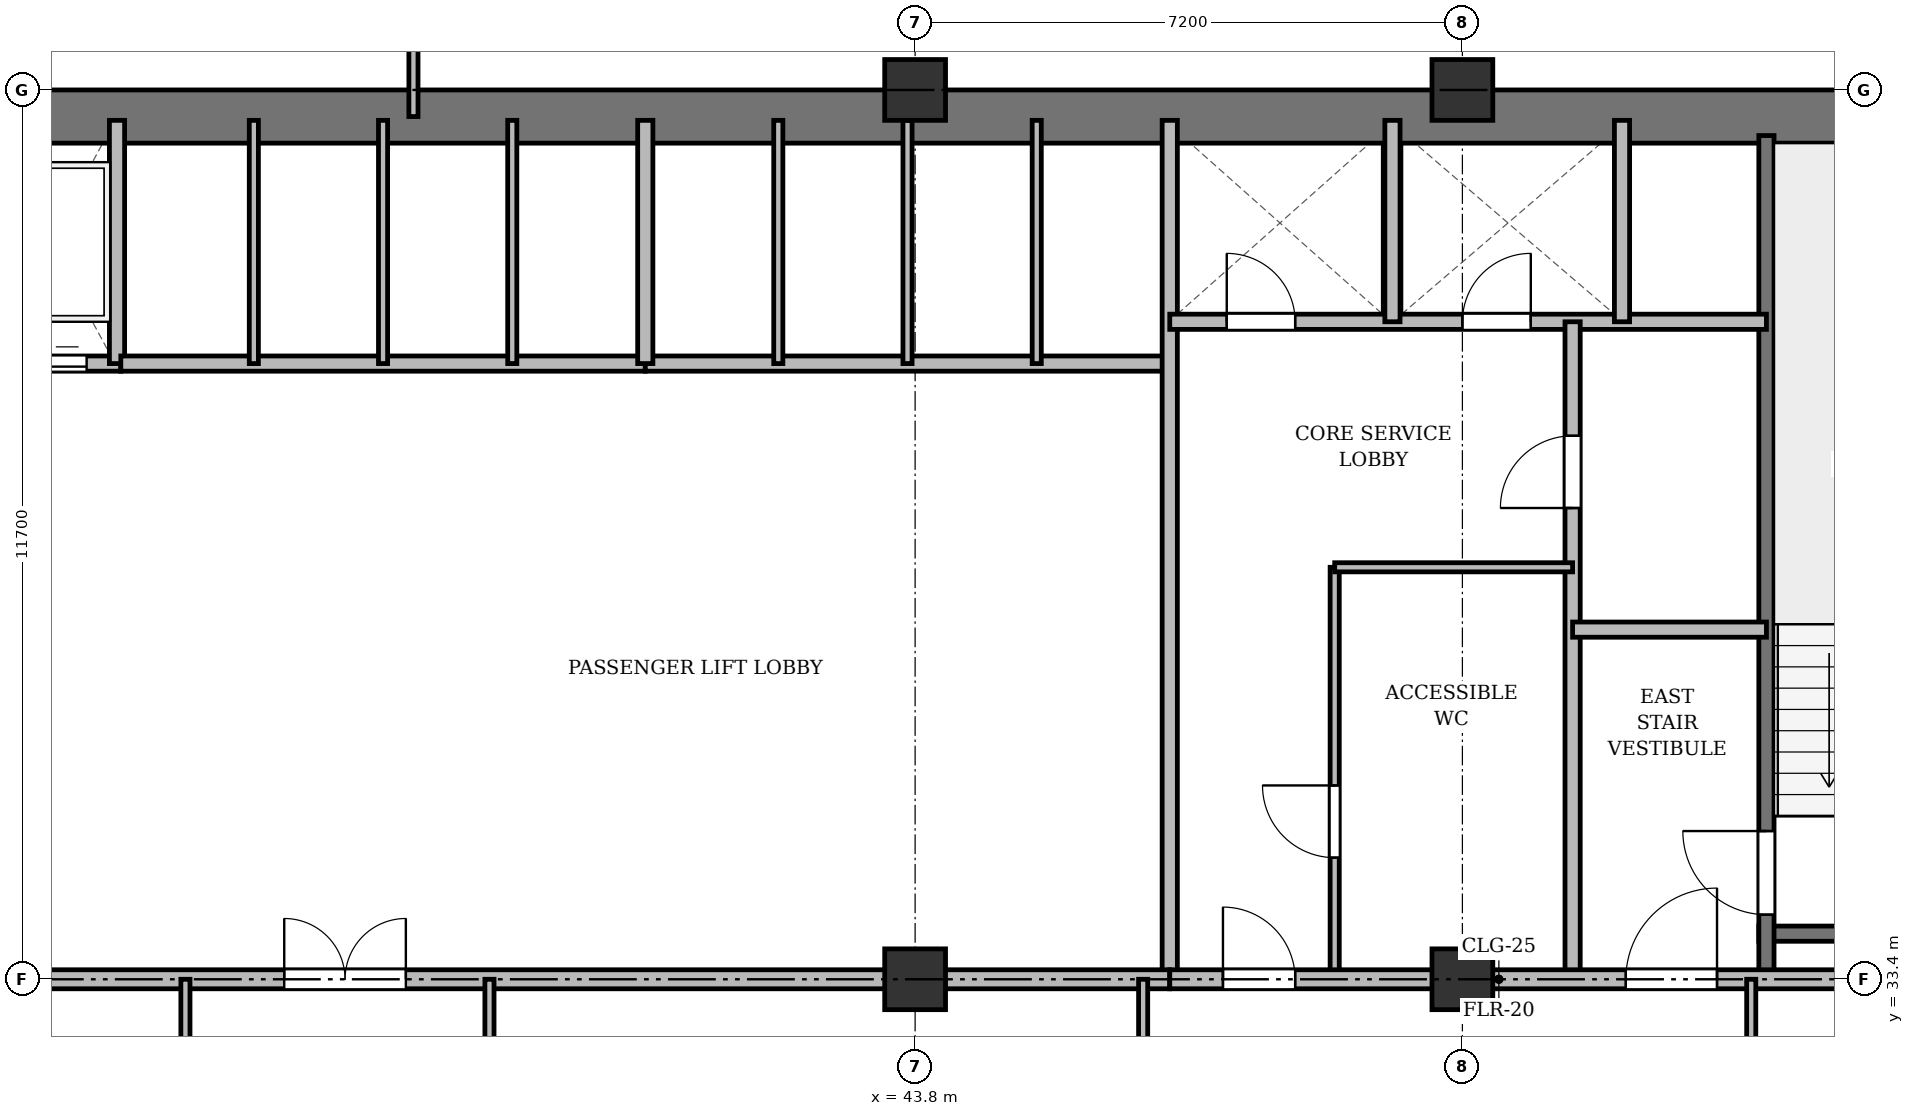
"""IFC4 building model, lengths in metres.
Left out: names, types, materials, properties, quantities, classifications, styles, units other than length and angle.
Written with IfcOpenShell. Run it as: python <this file> out.ifc"""

import sys

from ifc_helpers import new_model, si_unit, direction, frame, frame_2d, origin, origin_2d, place, context, subcontext, project, spatial, rectangle, extrude, source, transform, mapped, element, fill, save


model = new_model("IFC4")
c1 = context("Model", 3, precision=1e-05, world=origin(), true_north=direction((0.0, 1.0)))
c2 = subcontext(c1, "Body", "Model", "MODEL_VIEW")
j1 = project(units=[si_unit("LENGTHUNIT", "METRE"), si_unit("PLANEANGLEUNIT", "RADIAN")], contexts=[c1])
p1 = place(None, origin())
s1 = spatial("IfcSite", under=j1, at=p1, CompositionType="ELEMENT")
p2 = place(p1, origin())
s2 = spatial("IfcBuilding", under=s1, at=p2, CompositionType="ELEMENT")
p3 = place(p2, frame((0.0, 0.0, 121.3)))
s3 = spatial("IfcBuildingStorey", under=s2, at=p3, CompositionType="ELEMENT", Elevation=121.3)
m1 = source(origin(), c2, "Body", "SweptSolid", [
    extrude(rectangle(XDim=0.8, YDim=0.8, at=origin_2d()), origin(), (0.0, 0.0, 1.0), 3.6),
])
for number, where, z_axis, x_axis in (
    (1, (43.8, 33.4, 0.0), (0.0, 0.0, 1.0), (1.0, 0.0, 0.0)),
    (2, (43.8, 45.1, 0.0), (0.0, 0.0, 1.0), (1.0, 0.0, 0.0)),
    (3, (51.0, 33.4, 0.0), (0.0, 0.0, 1.0), (1.0, 0.0, 0.0)),
    (4, (51.0, 45.1, 0.0), (0.0, 0.0, 1.0), (1.0, 0.0, 0.0)),
):
    element("IfcColumn", number, at=place(p3, frame(where, z_axis=z_axis, x_axis=x_axis)), inside=s3, PredefinedType="COLUMN", context=c2, shape_type="MappedRepresentation", body=[
        mapped(m1, transform((0.0, 0.0, 0.0), x_axis=(1.0, 0.0, 0.0), y_axis=(0.0, 1.0, 0.0), z_axis=(0.0, 0.0, 1.0), scale=1.0)),
    ])
p4 = place(p3, frame((15.5, 44.75, 0.0), z_axis=(0.0, 0.0, 1.0), x_axis=(1.0, 0.0, 0.0)))
e5 = element("IfcWall", 5, at=p4, inside=s3, PredefinedType="SHEAR", context=c2, shape_type="SweptSolid", body=[
    extrude(rectangle(XDim=43.4, YDim=0.7, at=frame_2d((21.7, 0.0))), origin(), (0.0, 0.0, 1.0), 3.34),
])
p5 = place(p3, frame((54.9, 34.0, 0.0), z_axis=(0.0, 0.0, 1.0), x_axis=(1.0, 0.0, 0.0)))
e6 = element("IfcWall", 6, at=p5, inside=s3, PredefinedType="SHEAR", context=c2, shape_type="SweptSolid", body=[
    extrude(rectangle(XDim=3.4, YDim=0.2, at=frame_2d((1.7, 0.0))), origin(), (0.0, 0.0, 1.0), 3.34),
])
p6 = place(p3, frame((55.0, 33.4, 0.0), z_axis=(0.0, 0.0, 1.0), x_axis=(0.0, 1.0, 0.0)))
e7 = element("IfcWall", 7, at=p6, inside=s3, PredefinedType="SHEAR", context=c2, shape_type="SweptSolid", body=[
    extrude(rectangle(XDim=11.1, YDim=0.2, at=frame_2d((5.55, 0.0))), origin(), (0.0, 0.0, 1.0), 3.34),
])
p7 = place(p6, frame((0.85, 0.0, 0.0)))
e8 = element("IfcOpeningElement", 8, at=p7, cuts=e7, PredefinedType="OPENING", context=c2, shape_type="SweptSolid", body=[
    extrude(rectangle(XDim=1.1, YDim=2.15, at=frame_2d((0.55, 1.075))), frame((0.0, 0.11, 0.0), z_axis=(0.0, -1.0, 0.0), x_axis=(1.0, 0.0, 0.0)), (0.0, 0.0, 1.0), 0.22),
])
p8 = place(p3, frame((26.4, 41.5, 0.0), z_axis=(0.0, 0.0, 1.0), x_axis=(1.0, 0.0, 0.0)))
e9 = element("IfcWall", 9, at=p8, inside=s3, PredefinedType="SOLIDWALL", context=c2, shape_type="SweptSolid", body=[
    extrude(rectangle(XDim=6.95, YDim=0.2, at=frame_2d((3.475, 0.0))), origin(), (0.0, 0.0, 1.0), 3.34),
])
p9 = place(p8, frame((0.35, 0.0, 0.0)))
e10 = element("IfcOpeningElement", 10, at=p9, cuts=e9, PredefinedType="OPENING", context=c2, shape_type="SweptSolid", body=[
    extrude(rectangle(XDim=1.05, YDim=2.15, at=frame_2d((0.525, 1.075))), frame((0.0, 0.11, 0.0), z_axis=(0.0, -1.0, 0.0), x_axis=(1.0, 0.0, 0.0)), (0.0, 0.0, 1.0), 0.22),
])
p10 = place(p8, frame((2.05, 0.0, 0.0)))
e11 = element("IfcOpeningElement", 11, at=p10, cuts=e9, PredefinedType="OPENING", context=c2, shape_type="SweptSolid", body=[
    extrude(rectangle(XDim=1.05, YDim=2.15, at=frame_2d((0.525, 1.075))), frame((0.0, 0.11, 0.0), z_axis=(0.0, -1.0, 0.0), x_axis=(1.0, 0.0, 0.0)), (0.0, 0.0, 1.0), 0.22),
])
p11 = place(p8, frame((3.75, 0.0, 0.0)))
e12 = element("IfcOpeningElement", 12, at=p11, cuts=e9, PredefinedType="OPENING", context=c2, shape_type="SweptSolid", body=[
    extrude(rectangle(XDim=1.05, YDim=2.15, at=frame_2d((0.525, 1.075))), frame((0.0, 0.11, 0.0), z_axis=(0.0, -1.0, 0.0), x_axis=(1.0, 0.0, 0.0)), (0.0, 0.0, 1.0), 0.22),
])
p12 = place(p8, frame((5.45, 0.0, 0.0)))
e13 = element("IfcOpeningElement", 13, at=p12, cuts=e9, PredefinedType="OPENING", context=c2, shape_type="SweptSolid", body=[
    extrude(rectangle(XDim=1.05, YDim=2.15, at=frame_2d((0.525, 1.075))), frame((0.0, 0.11, 0.0), z_axis=(0.0, -1.0, 0.0), x_axis=(1.0, 0.0, 0.0)), (0.0, 0.0, 1.0), 0.22),
])
p13 = place(p3, frame((33.3, 41.5, 0.0), z_axis=(0.0, 0.0, 1.0), x_axis=(0.0, 1.0, 0.0)))
e14 = element("IfcWall", 14, at=p13, inside=s3, PredefinedType="SOLIDWALL", context=c2, shape_type="SweptSolid", body=[
    extrude(rectangle(XDim=3.2, YDim=0.2, at=frame_2d((1.6, 0.0))), origin(), (0.0, 0.0, 1.0), 3.34),
])
p14 = place(p3, frame((33.35, 41.5, 0.0), z_axis=(0.0, 0.0, 1.0), x_axis=(1.0, 0.0, 0.0)))
e15 = element("IfcWall", 15, at=p14, inside=s3, PredefinedType="SOLIDWALL", context=c2, shape_type="SweptSolid", body=[
    extrude(rectangle(XDim=6.9, YDim=0.2, at=frame_2d((3.45, 0.0))), origin(), (0.0, 0.0, 1.0), 3.34),
])
for number, where, z_axis, x_axis in (
    (16, (35.1, 41.5, 0.0), (0.0, 0.0, 1.0), (0.0, 1.0, 0.0)),
    (17, (36.8, 41.5, 0.0), (0.0, 0.0, 1.0), (0.0, 1.0, 0.0)),
    (18, (38.5, 41.5, 0.0), (0.0, 0.0, 1.0), (0.0, 1.0, 0.0)),
):
    element("IfcWall", number, at=place(p3, frame(where, z_axis=z_axis, x_axis=x_axis)), inside=s3, PredefinedType="PARTITIONING", context=c2, shape_type="SweptSolid", body=[
        extrude(rectangle(XDim=3.2, YDim=0.12, at=frame_2d((1.6, 0.0))), origin(), (0.0, 0.0, 1.0), 3.34),
    ])
p15 = place(p3, frame((40.25, 41.5, 0.0), z_axis=(0.0, 0.0, 1.0), x_axis=(1.0, 0.0, 0.0)))
e19 = element("IfcWall", 19, at=p15, inside=s3, PredefinedType="SOLIDWALL", context=c2, shape_type="SweptSolid", body=[
    extrude(rectangle(XDim=6.9, YDim=0.2, at=frame_2d((3.45, 0.0))), origin(), (0.0, 0.0, 1.0), 2.84),
])
p16 = place(p3, frame((40.25, 41.5, 0.0), z_axis=(0.0, 0.0, 1.0), x_axis=(0.0, 1.0, 0.0)))
e20 = element("IfcWall", 20, at=p16, inside=s3, PredefinedType="SOLIDWALL", context=c2, shape_type="SweptSolid", body=[
    extrude(rectangle(XDim=3.2, YDim=0.2, at=frame_2d((1.6, 0.0))), origin(), (0.0, 0.0, 1.0), 3.34),
])
p17 = place(p3, frame((42.0, 41.5, 0.0), z_axis=(0.0, 0.0, 1.0), x_axis=(0.0, 1.0, 0.0)))
e21 = element("IfcWall", 21, at=p17, inside=s3, PredefinedType="PARTITIONING", context=c2, shape_type="SweptSolid", body=[
    extrude(rectangle(XDim=3.2, YDim=0.12, at=frame_2d((1.6, 0.0))), origin(), (0.0, 0.0, 1.0), 3.34),
])
p18 = place(p3, frame((43.7, 41.5, 0.0), z_axis=(0.0, 0.0, 1.0), x_axis=(0.0, 1.0, 0.0)))
e22 = element("IfcWall", 22, at=p18, inside=s3, PredefinedType="PARTITIONING", context=c2, shape_type="SweptSolid", body=[
    extrude(rectangle(XDim=3.2, YDim=0.12, at=frame_2d((1.6, 0.0))), origin(), (0.0, 0.0, 1.0), 2.84),
])
p19 = place(p3, frame((45.4, 41.5, 0.0), z_axis=(0.0, 0.0, 1.0), x_axis=(0.0, 1.0, 0.0)))
e23 = element("IfcWall", 23, at=p19, inside=s3, PredefinedType="PARTITIONING", context=c2, shape_type="SweptSolid", body=[
    extrude(rectangle(XDim=3.2, YDim=0.12, at=frame_2d((1.6, 0.0))), origin(), (0.0, 0.0, 1.0), 3.34),
])
p20 = place(p3, frame((47.15, 33.4, 0.0), z_axis=(0.0, 0.0, 1.0), x_axis=(0.0, 1.0, 0.0)))
e24 = element("IfcWall", 24, at=p20, inside=s3, PredefinedType="SOLIDWALL", context=c2, shape_type="SweptSolid", body=[
    extrude(rectangle(XDim=11.3, YDim=0.2, at=frame_2d((5.65, 0.0))), origin(), (0.0, 0.0, 1.0), 2.752),
])
p21 = place(p3, frame((26.3, 33.4, 0.0), z_axis=(0.0, 0.0, 1.0), x_axis=(1.0, 0.0, 0.0)))
e25 = element("IfcWall", 25, at=p21, inside=s3, PredefinedType="PARTITIONING", context=c2, shape_type="SweptSolid", body=[
    extrude(rectangle(XDim=20.85, YDim=0.25, at=frame_2d((10.425, 0.0))), origin(), (0.0, 0.0, 1.0), 2.752),
])
p22 = place(p21, frame((9.2, 0.0, 0.0)))
e26 = element("IfcOpeningElement", 26, at=p22, cuts=e25, PredefinedType="OPENING", context=c2, shape_type="SweptSolid", body=[
    extrude(rectangle(XDim=1.6, YDim=2.2, at=frame_2d((0.8, 1.1))), frame((0.0, 0.135, 0.0), z_axis=(0.0, -1.0, 0.0), x_axis=(1.0, 0.0, 0.0)), (0.0, 0.0, 1.0), 0.27),
])
p23 = place(p3, frame((47.15, 42.05, 0.0), z_axis=(0.0, 0.0, 1.0), x_axis=(1.0, 0.0, 0.0)))
e27 = element("IfcWall", 27, at=p23, inside=s3, PredefinedType="SOLIDWALL", context=c2, shape_type="SweptSolid", body=[
    extrude(rectangle(XDim=7.85, YDim=0.2, at=frame_2d((3.925, 0.0))), origin(), (0.0, 0.0, 1.0), 2.84),
])
p24 = place(p23, frame((0.75, 0.0, 0.0)))
e28 = element("IfcOpeningElement", 28, at=p24, cuts=e27, PredefinedType="OPENING", context=c2, shape_type="SweptSolid", body=[
    extrude(rectangle(XDim=0.9, YDim=2.1, at=frame_2d((0.45, 1.05))), frame((0.0, 0.11, 0.0), z_axis=(0.0, -1.0, 0.0), x_axis=(1.0, 0.0, 0.0)), (0.0, 0.0, 1.0), 0.22),
])
p25 = place(p23, frame((3.85, 0.0, 0.0)))
e29 = element("IfcOpeningElement", 29, at=p25, cuts=e27, PredefinedType="OPENING", context=c2, shape_type="SweptSolid", body=[
    extrude(rectangle(XDim=0.9, YDim=2.1, at=frame_2d((0.45, 1.05))), frame((0.0, 0.11, 0.0), z_axis=(0.0, -1.0, 0.0), x_axis=(1.0, 0.0, 0.0)), (0.0, 0.0, 1.0), 0.22),
])
for number, where, z_axis, x_axis in (
    (30, (50.08, 42.05, 0.0), (0.0, 0.0, 1.0), (0.0, 1.0, 0.0)),
    (31, (53.1, 42.05, 0.0), (0.0, 0.0, 1.0), (0.0, 1.0, 0.0)),
):
    element("IfcWall", number, at=place(p3, frame(where, z_axis=z_axis, x_axis=x_axis)), inside=s3, PredefinedType="SOLIDWALL", context=c2, shape_type="SweptSolid", body=[
        extrude(rectangle(XDim=2.65, YDim=0.2, at=frame_2d((1.325, 0.0))), origin(), (0.0, 0.0, 1.0), 3.34),
    ])
p26 = place(p3, frame((52.45, 33.4, 0.0), z_axis=(0.0, 0.0, 1.0), x_axis=(0.0, 1.0, 0.0)))
e32 = element("IfcWall", 32, at=p26, inside=s3, PredefinedType="PARTITIONING", context=c2, shape_type="SweptSolid", body=[
    extrude(rectangle(XDim=8.65, YDim=0.2, at=frame_2d((4.325, 0.0))), origin(), (0.0, 0.0, 1.0), 2.752),
])
p27 = place(p26, frame((6.2, 0.0, 0.0)))
e33 = element("IfcOpeningElement", 33, at=p27, cuts=e32, PredefinedType="OPENING", context=c2, shape_type="SweptSolid", body=[
    extrude(rectangle(XDim=0.95, YDim=2.15, at=frame_2d((0.475, 1.075))), frame((0.0, 0.11, 0.0), z_axis=(0.0, -1.0, 0.0), x_axis=(1.0, 0.0, 0.0)), (0.0, 0.0, 1.0), 0.22),
])
p28 = place(p3, frame((52.45, 38.0, 0.0), z_axis=(0.0, 0.0, 1.0), x_axis=(1.0, 0.0, 0.0)))
e34 = element("IfcWall", 34, at=p28, inside=s3, PredefinedType="PARTITIONING", context=c2, shape_type="SweptSolid", body=[
    extrude(rectangle(XDim=2.55, YDim=0.2, at=frame_2d((1.275, 0.0))), origin(), (0.0, 0.0, 1.0), 3.34),
])
p29 = place(p3, frame((49.32, 33.4, 0.0), z_axis=(0.0, 0.0, 1.0), x_axis=(0.0, 1.0, 0.0)))
e35 = element("IfcWall", 35, at=p29, inside=s3, PredefinedType="PARTITIONING", context=c2, shape_type="SweptSolid", body=[
    extrude(rectangle(XDim=5.42, YDim=0.12, at=frame_2d((2.71, 0.0))), origin(), (0.0, 0.0, 1.0), 2.752),
])
p30 = place(p29, frame((1.6, 0.0, 0.0)))
e36 = element("IfcOpeningElement", 36, at=p30, cuts=e35, PredefinedType="OPENING", context=c2, shape_type="SweptSolid", body=[
    extrude(rectangle(XDim=0.95, YDim=2.15, at=frame_2d((0.475, 1.075))), frame((0.0, 0.07, 0.0), z_axis=(0.0, -1.0, 0.0), x_axis=(1.0, 0.0, 0.0)), (0.0, 0.0, 1.0), 0.14),
])
p31 = place(p3, frame((49.32, 38.82, 0.0), z_axis=(0.0, 0.0, 1.0), x_axis=(1.0, 0.0, 0.0)))
e37 = element("IfcWall", 37, at=p31, inside=s3, PredefinedType="PARTITIONING", context=c2, shape_type="SweptSolid", body=[
    extrude(rectangle(XDim=3.13, YDim=0.12, at=frame_2d((1.565, 0.0))), origin(), (0.0, 0.0, 1.0), 2.84),
])
p32 = place(p3, frame((47.15, 33.4, 0.0), z_axis=(0.0, 0.0, 1.0), x_axis=(1.0, 0.0, 0.0)))
e38 = element("IfcWall", 38, at=p32, inside=s3, PredefinedType="PARTITIONING", context=c2, shape_type="SweptSolid", body=[
    extrude(rectangle(XDim=11.15, YDim=0.25, at=frame_2d((5.575, 0.0))), origin(), (0.0, 0.0, 1.0), 2.752),
])
p33 = place(p32, frame((0.7, 0.0, 0.0)))
e39 = element("IfcOpeningElement", 39, at=p33, cuts=e38, PredefinedType="OPENING", context=c2, shape_type="SweptSolid", body=[
    extrude(rectangle(XDim=0.95, YDim=2.15, at=frame_2d((0.475, 1.075))), frame((0.0, 0.135, 0.0), z_axis=(0.0, -1.0, 0.0), x_axis=(1.0, 0.0, 0.0)), (0.0, 0.0, 1.0), 0.27),
])
p34 = place(p32, frame((6.0, 0.0, 0.0)))
e40 = element("IfcOpeningElement", 40, at=p34, cuts=e38, PredefinedType="OPENING", context=c2, shape_type="SweptSolid", body=[
    extrude(rectangle(XDim=1.2, YDim=2.15, at=frame_2d((0.6, 1.075))), frame((0.0, 0.135, 0.0), z_axis=(0.0, -1.0, 0.0), x_axis=(1.0, 0.0, 0.0)), (0.0, 0.0, 1.0), 0.27),
])
for number, where, z_axis, x_axis in (
    (41, (34.2, 29.8, 0.0), (0.0, 0.0, 1.0), (0.0, 1.0, 0.0)),
    (42, (38.2, 29.8, 0.0), (0.0, 0.0, 1.0), (0.0, 1.0, 0.0)),
    (43, (46.8, 29.8, 0.0), (0.0, 0.0, 1.0), (0.0, 1.0, 0.0)),
    (44, (54.8, 29.8, 0.0), (0.0, 0.0, 1.0), (0.0, 1.0, 0.0)),
):
    element("IfcWall", number, at=place(p3, frame(where, z_axis=z_axis, x_axis=x_axis)), inside=s3, PredefinedType="PARTITIONING", context=c2, shape_type="SweptSolid", body=[
        extrude(rectangle(XDim=3.6, YDim=0.12, at=frame_2d((1.8, 0.0))), origin(), (0.0, 0.0, 1.0), 2.752),
    ])
p35 = place(p3, frame((37.2, 44.75, 0.0), z_axis=(0.0, 0.0, 1.0), x_axis=(0.0, 1.0, 0.0)))
e45 = element("IfcWall", 45, at=p35, inside=s3, PredefinedType="PARTITIONING", context=c2, shape_type="SweptSolid", body=[
    extrude(rectangle(XDim=3.61, YDim=0.12, at=frame_2d((1.805, 0.0))), origin(), (0.0, 0.0, 1.0), 2.752),
])
p36 = place(p35, frame((1.1, 0.0, 0.0)))
e46 = element("IfcOpeningElement", 46, at=p36, cuts=e45, PredefinedType="OPENING", context=c2, shape_type="SweptSolid", body=[
    extrude(rectangle(XDim=0.95, YDim=2.15, at=frame_2d((0.475, 1.075))), frame((0.0, 0.07, 0.0), z_axis=(0.0, -1.0, 0.0), x_axis=(1.0, 0.0, 0.0)), (0.0, 0.0, 1.0), 0.14),
])
m2 = source(origin(), c2, "Body", "SweptSolid", [
    extrude(rectangle(XDim=1.1, YDim=2.15, at=frame_2d((0.55, 1.075))), frame((0.0, 0.025, 0.0), z_axis=(0.0, -1.0, 0.0), x_axis=(1.0, 0.0, 0.0)), (0.0, 0.0, 1.0), 0.05),
])
p37 = place(p7, origin())
e47 = element("IfcDoor", 47, at=p37, inside=s3, OperationType="SINGLE_SWING_RIGHT", PredefinedType="DOOR", context=c2, shape_type="MappedRepresentation", body=[
    mapped(m2, transform((0.0, 0.0, 0.0), x_axis=(1.0, 0.0, 0.0), y_axis=(0.0, 1.0, 0.0), z_axis=(0.0, 0.0, 1.0), scale=1.0)),
])
fill(e8, e47)
m3 = source(origin(), c2, "Body", "SweptSolid", [
    extrude(rectangle(XDim=1.05, YDim=2.15, at=frame_2d((0.525, 1.075))), frame((0.0, 0.025, 0.0), z_axis=(0.0, -1.0, 0.0), x_axis=(1.0, 0.0, 0.0)), (0.0, 0.0, 1.0), 0.05),
])
p38 = place(p12, origin())
e48 = element("IfcDoor", 48, at=p38, inside=s3, OperationType="DOUBLE_DOOR_SLIDING", PredefinedType="DOOR", context=c2, shape_type="MappedRepresentation", body=[
    mapped(m3, transform((0.0, 0.0, 0.0), x_axis=(1.0, 0.0, 0.0), y_axis=(0.0, 1.0, 0.0), z_axis=(0.0, 0.0, 1.0), scale=1.0)),
])
fill(e13, e48)
m4 = source(origin(), c2, "Body", "SweptSolid", [
    extrude(rectangle(XDim=1.6, YDim=2.2, at=frame_2d((0.8, 1.1))), frame((0.0, 0.025, 0.0), z_axis=(0.0, -1.0, 0.0), x_axis=(1.0, 0.0, 0.0)), (0.0, 0.0, 1.0), 0.05),
])
p39 = place(p22, origin())
e49 = element("IfcDoor", 49, at=p39, inside=s3, OperationType="DOUBLE_DOOR_SINGLE_SWING", PredefinedType="DOOR", context=c2, shape_type="MappedRepresentation", body=[
    mapped(m4, transform((0.0, 0.0, 0.0), x_axis=(1.0, 0.0, 0.0), y_axis=(0.0, 1.0, 0.0), z_axis=(0.0, 0.0, 1.0), scale=1.0)),
])
fill(e26, e49)
m5 = source(origin(), c2, "Body", "SweptSolid", [
    extrude(rectangle(XDim=0.9, YDim=2.1, at=frame_2d((0.45, 1.05))), frame((0.0, 0.025, 0.0), z_axis=(0.0, -1.0, 0.0), x_axis=(1.0, 0.0, 0.0)), (0.0, 0.0, 1.0), 0.05),
])
p40 = place(p24, origin())
e50 = element("IfcDoor", 50, at=p40, inside=s3, OperationType="SINGLE_SWING_LEFT", PredefinedType="DOOR", context=c2, shape_type="MappedRepresentation", body=[
    mapped(m5, transform((0.0, 0.0, 0.0), x_axis=(1.0, 0.0, 0.0), y_axis=(0.0, 1.0, 0.0), z_axis=(0.0, 0.0, 1.0), scale=1.0)),
])
fill(e28, e50)
p41 = place(p25, origin())
e51 = element("IfcDoor", 51, at=p41, inside=s3, OperationType="SINGLE_SWING_RIGHT", PredefinedType="DOOR", context=c2, shape_type="MappedRepresentation", body=[
    mapped(m5, transform((0.0, 0.0, 0.0), x_axis=(1.0, 0.0, 0.0), y_axis=(0.0, 1.0, 0.0), z_axis=(0.0, 0.0, 1.0), scale=1.0)),
])
fill(e29, e51)
m6 = source(origin(), c2, "Body", "SweptSolid", [
    extrude(rectangle(XDim=0.95, YDim=2.15, at=frame_2d((0.475, 1.075))), frame((0.0, 0.025, 0.0), z_axis=(0.0, -1.0, 0.0), x_axis=(1.0, 0.0, 0.0)), (0.0, 0.0, 1.0), 0.05),
])
p42 = place(p27, origin())
e52 = element("IfcDoor", 52, at=p42, inside=s3, OperationType="SINGLE_SWING_LEFT", PredefinedType="DOOR", context=c2, shape_type="MappedRepresentation", body=[
    mapped(m6, transform((0.0, 0.0, 0.0), x_axis=(1.0, 0.0, 0.0), y_axis=(0.0, 1.0, 0.0), z_axis=(0.0, 0.0, 1.0), scale=1.0)),
])
fill(e33, e52)
p43 = place(p30, origin())
e53 = element("IfcDoor", 53, at=p43, inside=s3, OperationType="SINGLE_SWING_RIGHT", PredefinedType="DOOR", context=c2, shape_type="MappedRepresentation", body=[
    mapped(m6, transform((0.0, 0.0, 0.0), x_axis=(1.0, 0.0, 0.0), y_axis=(0.0, 1.0, 0.0), z_axis=(0.0, 0.0, 1.0), scale=1.0)),
])
fill(e36, e53)
p44 = place(p33, origin())
e54 = element("IfcDoor", 54, at=p44, inside=s3, OperationType="SINGLE_SWING_LEFT", PredefinedType="DOOR", context=c2, shape_type="MappedRepresentation", body=[
    mapped(m6, transform((0.0, 0.0, 0.0), x_axis=(1.0, 0.0, 0.0), y_axis=(0.0, 1.0, 0.0), z_axis=(0.0, 0.0, 1.0), scale=1.0)),
])
fill(e39, e54)
m7 = source(origin(), c2, "Body", "SweptSolid", [
    extrude(rectangle(XDim=1.2, YDim=2.15, at=frame_2d((0.6, 1.075))), frame((0.0, 0.025, 0.0), z_axis=(0.0, -1.0, 0.0), x_axis=(1.0, 0.0, 0.0)), (0.0, 0.0, 1.0), 0.05),
])
p45 = place(p34, origin())
e55 = element("IfcDoor", 55, at=p45, inside=s3, OperationType="SINGLE_SWING_RIGHT", PredefinedType="DOOR", context=c2, shape_type="MappedRepresentation", body=[
    mapped(m7, transform((0.0, 0.0, 0.0), x_axis=(1.0, 0.0, 0.0), y_axis=(0.0, 1.0, 0.0), z_axis=(0.0, 0.0, 1.0), scale=1.0)),
])
fill(e40, e55)
save(model, sys.argv[1])
